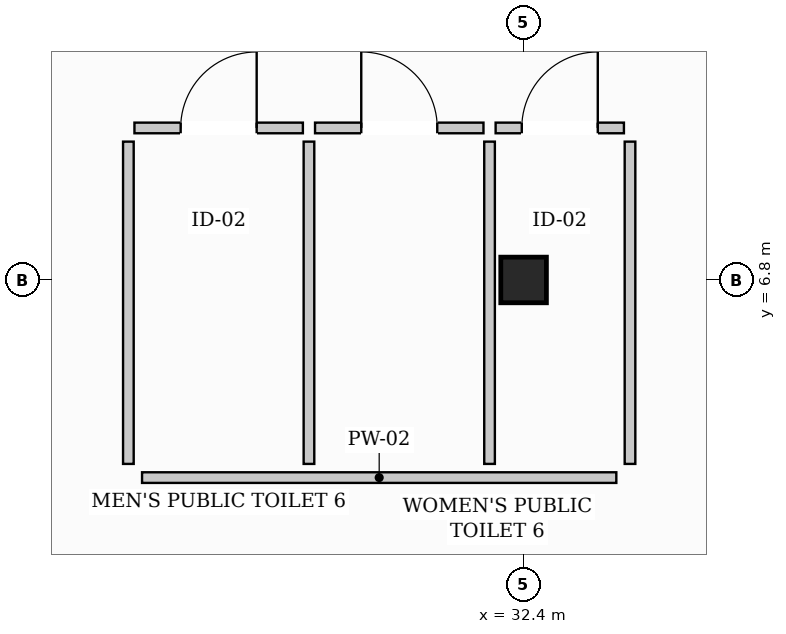
"""IFC4 building model, lengths in metres.
Left out: names, types, materials, properties, quantities, classifications, styles, units other than length and angle.
Written with IfcOpenShell. Run it as: python <this file> out.ifc"""

import sys

from ifc_helpers import new_model, si_unit, direction, frame, frame_2d, origin, origin_2d, place, context, subcontext, project, spatial, rectangle, extrude, element, fill, save


model = new_model("IFC4")
c1 = context("Model", 3, precision=1e-05, world=origin(), true_north=direction((0.0, 1.0)))
c2 = subcontext(c1, "Body", "Model", "MODEL_VIEW")
j1 = project(units=[si_unit("LENGTHUNIT", "METRE"), si_unit("PLANEANGLEUNIT", "RADIAN")], contexts=[c1])
p1 = place(None, origin())
s1 = spatial("IfcSite", under=j1, at=p1, CompositionType="ELEMENT")
p2 = place(p1, origin())
s2 = spatial("IfcBuilding", under=s1, at=p2, CompositionType="ELEMENT")
p3 = place(p2, frame((0.0, 0.0, 9.6)))
s3 = spatial("IfcBuildingStorey", under=s2, at=p3, CompositionType="ELEMENT", Elevation=9.6)
p4 = place(p3, frame((32.4, 6.8, 0.0), z_axis=(0.0, 0.0, 1.0), x_axis=(1.0, 0.0, 0.0)))
e1 = element("IfcColumn", 1, at=p4, inside=s3, PredefinedType="COLUMN", context=c2, shape_type="SweptSolid", body=[
    extrude(rectangle(XDim=0.6, YDim=0.6, at=origin_2d()), origin(), (0.0, 0.0, 1.0), 3.6),
])
p5 = place(p3, frame((27.38, 4.2, 0.0), z_axis=(0.0, 0.0, 1.0), x_axis=(1.0, 0.0, 0.0)))
e2 = element("IfcWall", 2, at=p5, inside=s3, PredefinedType="PARTITIONING", context=c2, shape_type="SweptSolid", body=[
    extrude(rectangle(XDim=6.24, YDim=0.14, at=frame_2d((3.12, 0.0))), origin(), (0.0, 0.0, 1.0), 2.87),
])
p6 = place(p3, frame((27.2, 4.38, 0.0), z_axis=(0.0, 0.0, 1.0), x_axis=(0.0, 1.0, 0.0)))
e3 = element("IfcWall", 3, at=p6, inside=s3, PredefinedType="PARTITIONING", context=c2, shape_type="SweptSolid", body=[
    extrude(rectangle(XDim=4.24, YDim=0.14, at=frame_2d((2.12, 0.0))), origin(), (0.0, 0.0, 1.0), 2.57),
])
p7 = place(p3, frame((33.8, 4.38, 0.0), z_axis=(0.0, 0.0, 1.0), x_axis=(0.0, 1.0, 0.0)))
e4 = element("IfcWall", 4, at=p7, inside=s3, PredefinedType="PARTITIONING", context=c2, shape_type="SweptSolid", body=[
    extrude(rectangle(XDim=4.24, YDim=0.14, at=frame_2d((2.12, 0.0))), origin(), (0.0, 0.0, 1.0), 3.03),
])
for number, where, z_axis, x_axis in (
    (5, (29.576, 4.38, 0.0), (0.0, 0.0, 1.0), (0.0, 1.0, 0.0)),
    (6, (31.952, 4.38, 0.0), (0.0, 0.0, 1.0), (0.0, 1.0, 0.0)),
):
    element("IfcWall", number, at=place(p3, frame(where, z_axis=z_axis, x_axis=x_axis)), inside=s3, PredefinedType="PARTITIONING", context=c2, shape_type="SweptSolid", body=[
        extrude(rectangle(XDim=4.24, YDim=0.14, at=frame_2d((2.12, 0.0))), origin(), (0.0, 0.0, 1.0), 2.57),
    ])
p8 = place(p3, frame((27.28, 8.8, 0.0), z_axis=(0.0, 0.0, 1.0), x_axis=(1.0, 0.0, 0.0)))
e7 = element("IfcWall", 7, at=p8, inside=s3, PredefinedType="PARTITIONING", context=c2, shape_type="SweptSolid", body=[
    extrude(rectangle(XDim=2.216, YDim=0.14, at=frame_2d((1.108, 0.0))), origin(), (0.0, 0.0, 1.0), 2.99),
])
p9 = place(p8, frame((0.608, 0.0, 0.0)))
e8 = element("IfcOpeningElement", 8, at=p9, cuts=e7, PredefinedType="OPENING", context=c2, shape_type="SweptSolid", body=[
    extrude(rectangle(XDim=1.0, YDim=2.15, at=frame_2d((0.5, 1.075))), frame((0.0, 0.08, 0.0), z_axis=(0.0, -1.0, 0.0), x_axis=(1.0, 0.0, 0.0)), (0.0, 0.0, 1.0), 0.16),
])
p10 = place(p3, frame((29.656, 8.8, 0.0), z_axis=(0.0, 0.0, 1.0), x_axis=(1.0, 0.0, 0.0)))
e9 = element("IfcWall", 9, at=p10, inside=s3, PredefinedType="PARTITIONING", context=c2, shape_type="SweptSolid", body=[
    extrude(rectangle(XDim=2.216, YDim=0.14, at=frame_2d((1.108, 0.0))), origin(), (0.0, 0.0, 1.0), 3.32),
])
p11 = place(p10, frame((0.608, 0.0, 0.0)))
e10 = element("IfcOpeningElement", 10, at=p11, cuts=e9, PredefinedType="OPENING", context=c2, shape_type="SweptSolid", body=[
    extrude(rectangle(XDim=1.0, YDim=2.15, at=frame_2d((0.5, 1.075))), frame((0.0, 0.08, 0.0), z_axis=(0.0, -1.0, 0.0), x_axis=(1.0, 0.0, 0.0)), (0.0, 0.0, 1.0), 0.16),
])
p12 = place(p3, frame((32.032, 8.8, 0.0), z_axis=(0.0, 0.0, 1.0), x_axis=(1.0, 0.0, 0.0)))
e11 = element("IfcWall", 11, at=p12, inside=s3, PredefinedType="PARTITIONING", context=c2, shape_type="SweptSolid", body=[
    extrude(rectangle(XDim=1.688, YDim=0.14, at=frame_2d((0.844, 0.0))), origin(), (0.0, 0.0, 1.0), 2.47),
])
p13 = place(p12, frame((0.344, 0.0, 0.0)))
e12 = element("IfcOpeningElement", 12, at=p13, cuts=e11, PredefinedType="OPENING", context=c2, shape_type="SweptSolid", body=[
    extrude(rectangle(XDim=1.0, YDim=2.15, at=frame_2d((0.5, 1.075))), frame((0.0, 0.08, 0.0), z_axis=(0.0, -1.0, 0.0), x_axis=(1.0, 0.0, 0.0)), (0.0, 0.0, 1.0), 0.16),
])
p14 = place(p9, origin())
e13 = element("IfcDoor", 13, at=p14, inside=s3, OperationType="SINGLE_SWING_RIGHT", PredefinedType="DOOR", context=c2, shape_type="SweptSolid", body=[
    extrude(rectangle(XDim=1.0, YDim=2.15, at=frame_2d((0.5, 1.075))), frame((0.0, 0.025, 0.0), z_axis=(0.0, -1.0, 0.0), x_axis=(1.0, 0.0, 0.0)), (0.0, 0.0, 1.0), 0.05),
])
fill(e8, e13)
p15 = place(p11, origin())
e14 = element("IfcDoor", 14, at=p15, inside=s3, OperationType="SINGLE_SWING_LEFT", PredefinedType="DOOR", context=c2, shape_type="SweptSolid", body=[
    extrude(rectangle(XDim=1.0, YDim=2.15, at=frame_2d((0.5, 1.075))), frame((0.0, 0.025, 0.0), z_axis=(0.0, -1.0, 0.0), x_axis=(1.0, 0.0, 0.0)), (0.0, 0.0, 1.0), 0.05),
])
fill(e10, e14)
p16 = place(p13, origin())
e15 = element("IfcDoor", 15, at=p16, inside=s3, OperationType="SINGLE_SWING_RIGHT", PredefinedType="DOOR", context=c2, shape_type="SweptSolid", body=[
    extrude(rectangle(XDim=1.0, YDim=2.15, at=frame_2d((0.5, 1.075))), frame((0.0, 0.025, 0.0), z_axis=(0.0, -1.0, 0.0), x_axis=(1.0, 0.0, 0.0)), (0.0, 0.0, 1.0), 0.05),
])
fill(e12, e15)
save(model, sys.argv[1])
